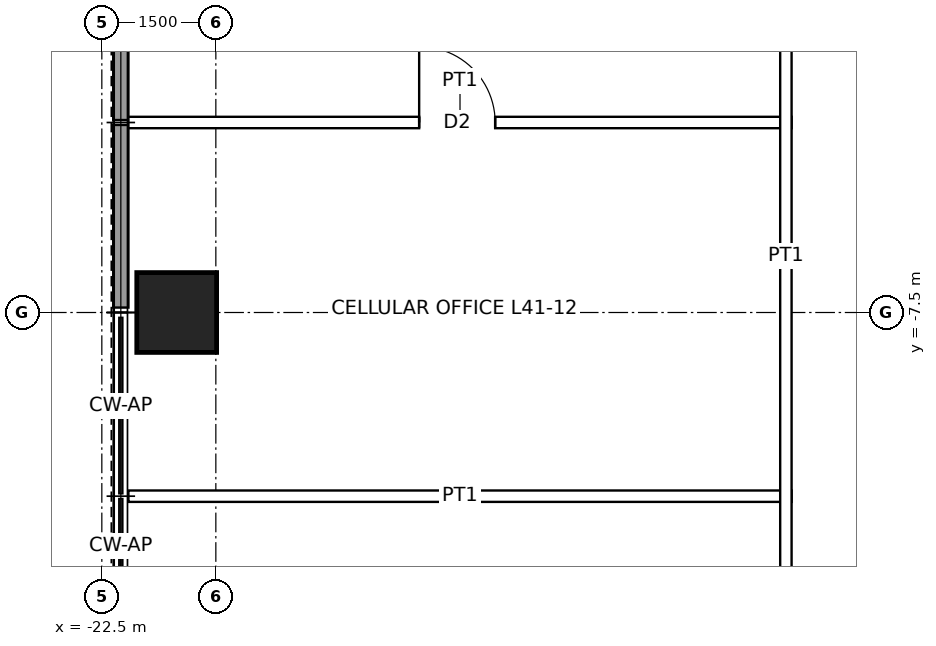
"""IFC4 building model, lengths in metres.
Left out: names, types, materials, properties, quantities, classifications, styles, units other than length and angle.
Written with IfcOpenShell. Run it as: python <this file> out.ifc"""

import sys

from ifc_helpers import new_model, si_unit, direction, frame, frame_2d, origin, origin_2d, place, context, subcontext, project, spatial, rectangle, hollow_rectangle, extrude, element, fill, save


model = new_model("IFC4")
c1 = context("Model", 3, precision=1e-05, world=origin(), true_north=direction((0.0, 1.0)))
c2 = subcontext(c1, "Body", "Model", "MODEL_VIEW")
j1 = project(units=[si_unit("LENGTHUNIT", "METRE"), si_unit("PLANEANGLEUNIT", "RADIAN")], contexts=[c1])
p1 = place(None, origin())
s1 = spatial("IfcSite", under=j1, at=p1, CompositionType="ELEMENT")
p2 = place(p1, origin())
s2 = spatial("IfcBuilding", under=s1, at=p2, CompositionType="ELEMENT")
p3 = place(p2, frame((0.0, 0.0, 197.9)))
s3 = spatial("IfcBuildingStorey", under=s2, at=p3, CompositionType="ELEMENT", Elevation=197.9)
p4 = place(p3, frame((-21.515, -7.5, 0.0), z_axis=(0.0, 0.0, 1.0), x_axis=(1.0, 0.0, 0.0)))
e1 = element("IfcColumn", 1, at=p4, inside=s3, PredefinedType="COLUMN", context=c2, shape_type="SweptSolid", body=[
    extrude(hollow_rectangle(XDim=1.05, YDim=1.05, WallThickness=0.07, at=origin_2d()), origin(), (0.0, 0.0, 1.0), 4.0),
])
p5 = place(p3, frame((-22.25, -7.435, 0.0), z_axis=(0.0, 0.0, 1.0), x_axis=(0.0, 1.0, 0.0)))
e2 = element("IfcWall", 2, at=p5, inside=s3, PredefinedType="SOLIDWALL", context=c2, shape_type="SweptSolid", body=[
    extrude(rectangle(XDim=2.403, YDim=0.2, at=frame_2d((1.201, 0.0))), origin(), (0.0, 0.0, 1.0), 3.85),
])
p6 = place(p3, frame((-22.25, -4.968, 0.0), z_axis=(0.0, 0.0, 1.0), x_axis=(0.0, 1.0, 0.0)))
e3 = element("IfcWall", 3, at=p6, inside=s3, PredefinedType="SOLIDWALL", context=c2, shape_type="SweptSolid", body=[
    extrude(rectangle(XDim=2.435, YDim=0.2, at=frame_2d((1.218, 0.0))), origin(), (0.0, 0.0, 1.0), 3.85),
])
p7 = place(p3, frame((-22.15, -9.917, 0.0), z_axis=(0.0, 0.0, 1.0), x_axis=(1.0, 0.0, 0.0)))
e4 = element("IfcWall", 4, at=p7, inside=s3, PredefinedType="PARTITIONING", context=c2, shape_type="SweptSolid", body=[
    extrude(rectangle(XDim=8.725, YDim=0.15, at=frame_2d((4.362, 0.0))), origin(), (0.0, 0.0, 1.0), 3.85),
])
p8 = place(p3, frame((-22.15, -5.0, 0.0), z_axis=(0.0, 0.0, 1.0), x_axis=(1.0, 0.0, 0.0)))
e5 = element("IfcWall", 5, at=p8, inside=s3, PredefinedType="PARTITIONING", context=c2, shape_type="SweptSolid", body=[
    extrude(rectangle(XDim=8.725, YDim=0.15, at=frame_2d((4.362, 0.0))), origin(), (0.0, 0.0, 1.0), 3.85),
])
p9 = place(p8, frame((3.825, 0.0, 0.0)))
e6 = element("IfcOpeningElement", 6, at=p9, cuts=e5, PredefinedType="OPENING", context=c2, shape_type="SweptSolid", body=[
    extrude(rectangle(XDim=1.0, YDim=2.1, at=frame_2d((0.5, 1.05))), frame((0.0, 0.085, 0.0), z_axis=(0.0, -1.0, 0.0), x_axis=(1.0, 0.0, 0.0)), (0.0, 0.0, 1.0), 0.17),
])
p10 = place(p3, frame((-13.5, -13.575, 0.0), z_axis=(0.0, 0.0, 1.0), x_axis=(0.0, 1.0, 0.0)))
e7 = element("IfcWall", 7, at=p10, inside=s3, PredefinedType="PARTITIONING", context=c2, shape_type="SweptSolid", body=[
    extrude(rectangle(XDim=13.65, YDim=0.15, at=frame_2d((6.825, 0.0))), origin(), (0.0, 0.0, 1.0), 3.85),
])
p11 = place(p9, origin())
e8 = element("IfcDoor", 8, at=p11, inside=s3, OperationType="SINGLE_SWING_LEFT", PredefinedType="DOOR", context=c2, shape_type="SweptSolid", body=[
    extrude(rectangle(XDim=1.0, YDim=2.1, at=frame_2d((0.5, 1.05))), frame((0.0, 0.025, 0.0), z_axis=(0.0, -1.0, 0.0), x_axis=(1.0, 0.0, 0.0)), (0.0, 0.0, 1.0), 0.05),
])
fill(e6, e8)
save(model, sys.argv[1])
